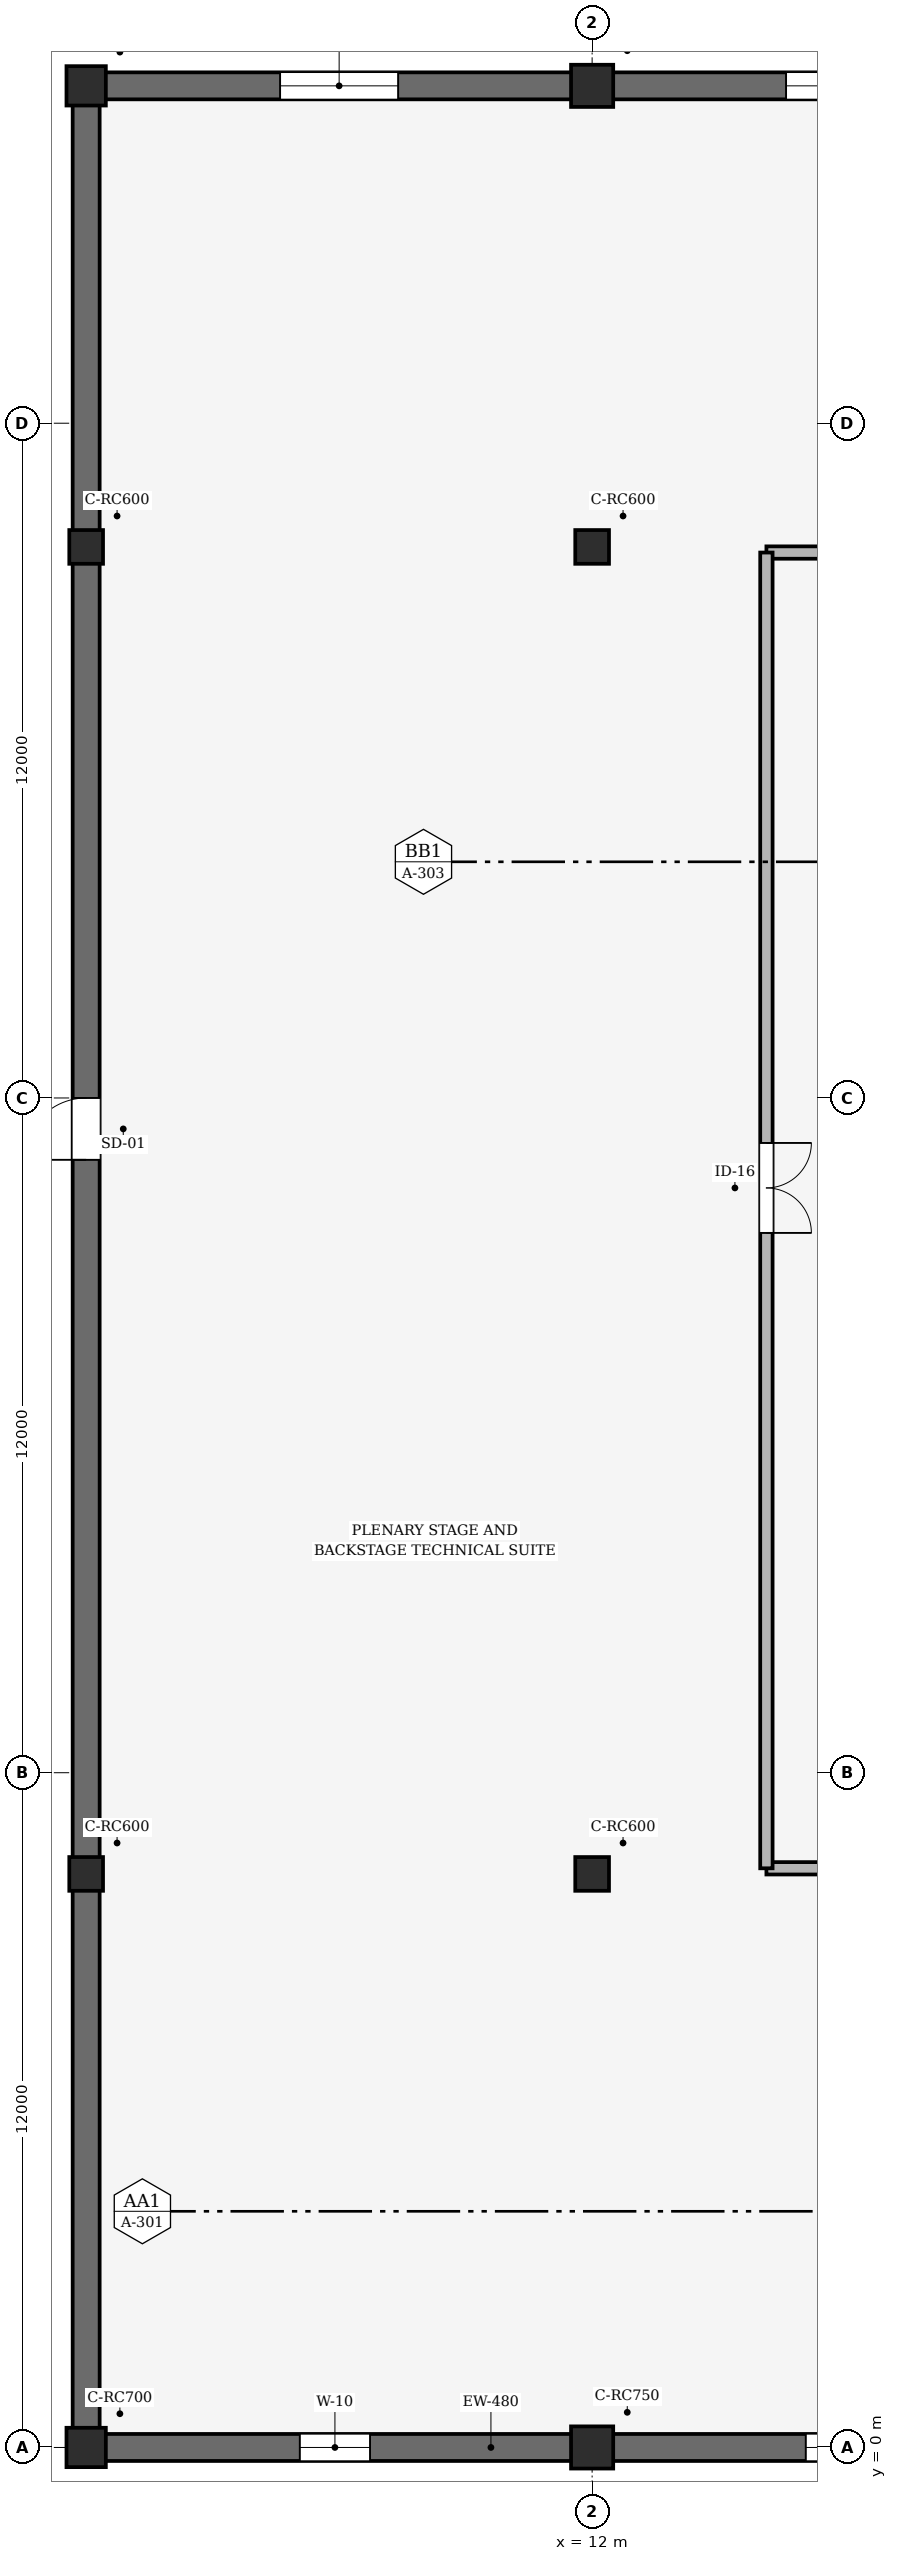
"""IFC4 building model, lengths in metres.
Left out: names, types, materials, properties, quantities, classifications, styles, units other than length and angle.
Written with IfcOpenShell. Run it as: python <this file> out.ifc"""

import sys

from ifc_helpers import new_model, si_unit, direction, frame, frame_2d, origin, origin_2d, place, context, subcontext, project, spatial, rectangle, extrude, element, fill, save


model = new_model("IFC4")
c1 = context("Model", 3, precision=1e-05, world=origin(), true_north=direction((0.0, 1.0)))
c2 = subcontext(c1, "Body", "Model", "MODEL_VIEW")
j1 = project(units=[si_unit("LENGTHUNIT", "METRE"), si_unit("PLANEANGLEUNIT", "RADIAN")], contexts=[c1])
p1 = place(None, origin())
s1 = spatial("IfcSite", under=j1, at=p1, CompositionType="ELEMENT")
p2 = place(p1, origin())
s2 = spatial("IfcBuilding", under=s1, at=p2, CompositionType="ELEMENT")
p3 = place(p2, origin())
s3 = spatial("IfcBuildingStorey", under=s2, at=p3, CompositionType="ELEMENT", Elevation=0.0)
for number, where, z_axis, x_axis in (
    (1, (3.0, 0.0, -0.44), (0.0, 0.0, 1.0), (1.0, 0.0, 0.0)),
    (2, (3.0, 42.0, -0.44), (0.0, 0.0, 1.0), (1.0, 0.0, 0.0)),
):
    element("IfcColumn", number, at=place(p3, frame(where, z_axis=z_axis, x_axis=x_axis)), inside=s3, PredefinedType="COLUMN", context=c2, shape_type="SweptSolid", body=[
        extrude(rectangle(XDim=0.7, YDim=0.7, at=origin_2d()), origin(), (0.0, 0.0, 1.0), 5.84),
    ])
for number, where, z_axis, x_axis in (
    (3, (3.0, 10.2, -0.44), (0.0, 0.0, 1.0), (1.0, 0.0, 0.0)),
    (4, (3.0, 33.8, -0.44), (0.0, 0.0, 1.0), (1.0, 0.0, 0.0)),
):
    element("IfcColumn", number, at=place(p3, frame(where, z_axis=z_axis, x_axis=x_axis)), inside=s3, PredefinedType="COLUMN", context=c2, shape_type="SweptSolid", body=[
        extrude(rectangle(XDim=0.6, YDim=0.6, at=origin_2d()), origin(), (0.0, 0.0, 1.0), 5.84),
    ])
for number, where, z_axis, x_axis in (
    (5, (12.0, 0.0, -0.44), (0.0, 0.0, 1.0), (1.0, 0.0, 0.0)),
    (6, (12.0, 42.0, -0.44), (0.0, 0.0, 1.0), (1.0, 0.0, 0.0)),
):
    element("IfcColumn", number, at=place(p3, frame(where, z_axis=z_axis, x_axis=x_axis)), inside=s3, PredefinedType="COLUMN", context=c2, shape_type="SweptSolid", body=[
        extrude(rectangle(XDim=0.75, YDim=0.75, at=origin_2d()), origin(), (0.0, 0.0, 1.0), 5.84),
    ])
for number, where, z_axis, x_axis in (
    (7, (12.0, 10.2, -0.44), (0.0, 0.0, 1.0), (1.0, 0.0, 0.0)),
    (8, (12.0, 33.8, -0.44), (0.0, 0.0, 1.0), (1.0, 0.0, 0.0)),
):
    element("IfcColumn", number, at=place(p3, frame(where, z_axis=z_axis, x_axis=x_axis)), inside=s3, PredefinedType="COLUMN", context=c2, shape_type="SweptSolid", body=[
        extrude(rectangle(XDim=0.6, YDim=0.6, at=origin_2d()), origin(), (0.0, 0.0, 1.0), 5.84),
    ])
p4 = place(p3, frame((3.0, 0.0, 0.0), z_axis=(0.0, 0.0, 1.0), x_axis=(1.0, 0.0, 0.0)))
e9 = element("IfcWall", 9, at=p4, inside=s3, PredefinedType="SOLIDWALL", context=c2, shape_type="SweptSolid", body=[
    extrude(rectangle(XDim=9.0, YDim=0.48, at=frame_2d((4.5, 0.0))), origin(), (0.0, 0.0, 1.0), 4.65),
])
p5 = place(p4, frame((3.8, 0.0, 1.3)))
e10 = element("IfcOpeningElement", 10, at=p5, cuts=e9, PredefinedType="OPENING", context=c2, shape_type="SweptSolid", body=[
    extrude(rectangle(XDim=1.25, YDim=1.85, at=frame_2d((0.625, 0.925))), frame((0.0, 0.25, 0.0), z_axis=(0.0, -1.0, 0.0), x_axis=(1.0, 0.0, 0.0)), (0.0, 0.0, 1.0), 0.5),
])
p6 = place(p3, frame((12.0, 42.0, 0.0), z_axis=(0.0, 0.0, 1.0), x_axis=(-1.0, 0.0, 0.0)))
e11 = element("IfcWall", 11, at=p6, inside=s3, PredefinedType="SOLIDWALL", context=c2, shape_type="SweptSolid", body=[
    extrude(rectangle(XDim=9.0, YDim=0.48, at=frame_2d((4.5, 0.0))), origin(), (0.0, 0.0, 1.0), 4.65),
])
p7 = place(p6, frame((3.45, 0.0, 0.9)))
e12 = element("IfcOpeningElement", 12, at=p7, cuts=e11, PredefinedType="OPENING", context=c2, shape_type="SweptSolid", body=[
    extrude(rectangle(XDim=2.1, YDim=2.95, at=frame_2d((1.05, 1.475))), frame((0.0, 0.25, 0.0), z_axis=(0.0, -1.0, 0.0), x_axis=(1.0, 0.0, 0.0)), (0.0, 0.0, 1.0), 0.5),
])
p8 = place(p3, frame((12.0, 0.0, 0.0), z_axis=(0.0, 0.0, 1.0), x_axis=(1.0, 0.0, 0.0)))
e13 = element("IfcWall", 13, at=p8, inside=s3, PredefinedType="SOLIDWALL", context=c2, shape_type="SweptSolid", body=[
    extrude(rectangle(XDim=9.0, YDim=0.48, at=frame_2d((4.5, 0.0))), origin(), (0.0, 0.0, 1.0), 4.65),
])
p9 = place(p8, frame((3.8, 0.0, 1.3)))
e14 = element("IfcOpeningElement", 14, at=p9, cuts=e13, PredefinedType="OPENING", context=c2, shape_type="SweptSolid", body=[
    extrude(rectangle(XDim=1.15, YDim=1.7, at=frame_2d((0.575, 0.85))), frame((0.0, 0.25, 0.0), z_axis=(0.0, -1.0, 0.0), x_axis=(1.0, 0.0, 0.0)), (0.0, 0.0, 1.0), 0.5),
])
p10 = place(p3, frame((21.0, 42.0, 0.0), z_axis=(0.0, 0.0, 1.0), x_axis=(-1.0, 0.0, 0.0)))
e15 = element("IfcWall", 15, at=p10, inside=s3, PredefinedType="SOLIDWALL", context=c2, shape_type="SweptSolid", body=[
    extrude(rectangle(XDim=9.0, YDim=0.48, at=frame_2d((4.5, 0.0))), origin(), (0.0, 0.0, 1.0), 4.65),
])
p11 = place(p10, frame((3.45, 0.0, 0.9)))
e16 = element("IfcOpeningElement", 16, at=p11, cuts=e15, PredefinedType="OPENING", context=c2, shape_type="SweptSolid", body=[
    extrude(rectangle(XDim=2.1, YDim=2.95, at=frame_2d((1.05, 1.475))), frame((0.0, 0.25, 0.0), z_axis=(0.0, -1.0, 0.0), x_axis=(1.0, 0.0, 0.0)), (0.0, 0.0, 1.0), 0.5),
])
p12 = place(p3, frame((3.0, 42.0, 0.0), z_axis=(0.0, 0.0, 1.0), x_axis=(0.0, -1.0, 0.0)))
e17 = element("IfcWall", 17, at=p12, inside=s3, PredefinedType="SOLIDWALL", context=c2, shape_type="SweptSolid", body=[
    extrude(rectangle(XDim=42.0, YDim=0.48, at=frame_2d((21.0, 0.0))), origin(), (0.0, 0.0, 1.0), 4.65),
])
p13 = place(p12, frame((18.0, 0.0, 0.0)))
e18 = element("IfcOpeningElement", 18, at=p13, cuts=e17, PredefinedType="OPENING", context=c2, shape_type="SweptSolid", body=[
    extrude(rectangle(XDim=1.1, YDim=2.2, at=frame_2d((0.55, 1.1))), frame((0.0, 0.25, 0.0), z_axis=(0.0, -1.0, 0.0), x_axis=(1.0, 0.0, 0.0)), (0.0, 0.0, 1.0), 0.5),
])
p14 = place(p3, frame((15.1, 10.3, 0.0), z_axis=(0.0, 0.0, 1.0), x_axis=(1.0, 0.0, 0.0)))
e19 = element("IfcWall", 19, at=p14, inside=s3, PredefinedType="SOLIDWALL", context=c2, shape_type="SweptSolid", body=[
    extrude(rectangle(XDim=35.8, YDim=0.22, at=frame_2d((17.9, 0.0))), origin(), (0.0, 0.0, 1.0), 4.1),
])
p15 = place(p14, frame((9.4, 0.0, 0.0)))
e20 = element("IfcOpeningElement", 20, at=p15, cuts=e19, PredefinedType="OPENING", context=c2, shape_type="SweptSolid", body=[
    extrude(rectangle(XDim=2.05, YDim=2.3, at=frame_2d((1.025, 1.15))), frame((0.0, 0.12, 0.0), z_axis=(0.0, -1.0, 0.0), x_axis=(1.0, 0.0, 0.0)), (0.0, 0.0, 1.0), 0.24),
])
p16 = place(p14, frame((27.4, 0.0, 0.0)))
e21 = element("IfcOpeningElement", 21, at=p16, cuts=e19, PredefinedType="OPENING", context=c2, shape_type="SweptSolid", body=[
    extrude(rectangle(XDim=2.05, YDim=2.3, at=frame_2d((1.025, 1.15))), frame((0.0, 0.12, 0.0), z_axis=(0.0, -1.0, 0.0), x_axis=(1.0, 0.0, 0.0)), (0.0, 0.0, 1.0), 0.24),
])
p17 = place(p3, frame((50.9, 33.7, 0.0), z_axis=(0.0, 0.0, 1.0), x_axis=(-1.0, 0.0, 0.0)))
e22 = element("IfcWall", 22, at=p17, inside=s3, PredefinedType="SOLIDWALL", context=c2, shape_type="SweptSolid", body=[
    extrude(rectangle(XDim=35.8, YDim=0.22, at=frame_2d((17.9, 0.0))), origin(), (0.0, 0.0, 1.0), 4.1),
])
p18 = place(p17, frame((15.35, 0.0, 0.0)))
e23 = element("IfcOpeningElement", 23, at=p18, cuts=e22, PredefinedType="OPENING", context=c2, shape_type="SweptSolid", body=[
    extrude(rectangle(XDim=2.05, YDim=2.3, at=frame_2d((1.025, 1.15))), frame((0.0, 0.12, 0.0), z_axis=(0.0, -1.0, 0.0), x_axis=(1.0, 0.0, 0.0)), (0.0, 0.0, 1.0), 0.24),
])
p19 = place(p17, frame((24.35, 0.0, 0.0)))
e24 = element("IfcOpeningElement", 24, at=p19, cuts=e22, PredefinedType="OPENING", context=c2, shape_type="SweptSolid", body=[
    extrude(rectangle(XDim=2.05, YDim=2.3, at=frame_2d((1.025, 1.15))), frame((0.0, 0.12, 0.0), z_axis=(0.0, -1.0, 0.0), x_axis=(1.0, 0.0, 0.0)), (0.0, 0.0, 1.0), 0.24),
])
p20 = place(p3, frame((15.1, 33.7, 0.0), z_axis=(0.0, 0.0, 1.0), x_axis=(0.0, -1.0, 0.0)))
e25 = element("IfcWall", 25, at=p20, inside=s3, PredefinedType="SOLIDWALL", context=c2, shape_type="SweptSolid", body=[
    extrude(rectangle(XDim=23.4, YDim=0.22, at=frame_2d((11.7, 0.0))), origin(), (0.0, 0.0, 1.0), 4.1),
])
p21 = place(p20, frame((10.5, 0.0, 0.0)))
e26 = element("IfcOpeningElement", 26, at=p21, cuts=e25, PredefinedType="OPENING", context=c2, shape_type="SweptSolid", body=[
    extrude(rectangle(XDim=1.6, YDim=2.2, at=frame_2d((0.8, 1.1))), frame((0.0, 0.12, 0.0), z_axis=(0.0, -1.0, 0.0), x_axis=(1.0, 0.0, 0.0)), (0.0, 0.0, 1.0), 0.24),
])
p22 = place(p5, origin())
e27 = element("IfcWindow", 27, at=p22, inside=s3, PartitioningType="SINGLE_PANEL", PredefinedType="WINDOW", context=c2, shape_type="SweptSolid", body=[
    extrude(rectangle(XDim=1.25, YDim=1.85, at=frame_2d((0.625, 0.925))), frame((0.0, 0.03, 0.0), z_axis=(0.0, -1.0, 0.0), x_axis=(1.0, 0.0, 0.0)), (0.0, 0.0, 1.0), 0.06),
])
fill(e10, e27)
p23 = place(p7, origin())
e28 = element("IfcWindow", 28, at=p23, inside=s3, PartitioningType="DOUBLE_PANEL_VERTICAL", PredefinedType="WINDOW", context=c2, shape_type="SweptSolid", body=[
    extrude(rectangle(XDim=2.1, YDim=2.95, at=frame_2d((1.05, 1.475))), frame((0.0, 0.03, 0.0), z_axis=(0.0, -1.0, 0.0), x_axis=(1.0, 0.0, 0.0)), (0.0, 0.0, 1.0), 0.06),
])
fill(e12, e28)
p24 = place(p9, origin())
e29 = element("IfcWindow", 29, at=p24, inside=s3, PartitioningType="SINGLE_PANEL", PredefinedType="WINDOW", context=c2, shape_type="SweptSolid", body=[
    extrude(rectangle(XDim=1.15, YDim=1.7, at=frame_2d((0.575, 0.85))), frame((0.0, 0.03, 0.0), z_axis=(0.0, -1.0, 0.0), x_axis=(1.0, 0.0, 0.0)), (0.0, 0.0, 1.0), 0.06),
])
fill(e14, e29)
p25 = place(p11, origin())
e30 = element("IfcWindow", 30, at=p25, inside=s3, PartitioningType="DOUBLE_PANEL_VERTICAL", PredefinedType="WINDOW", context=c2, shape_type="SweptSolid", body=[
    extrude(rectangle(XDim=2.1, YDim=2.95, at=frame_2d((1.05, 1.475))), frame((0.0, 0.03, 0.0), z_axis=(0.0, -1.0, 0.0), x_axis=(1.0, 0.0, 0.0)), (0.0, 0.0, 1.0), 0.06),
])
fill(e16, e30)
p26 = place(p13, frame((1.1, 0.0, 0.0), z_axis=(0.0, 0.0, 1.0), x_axis=(-1.0, 0.0, 0.0)))
e31 = element("IfcDoor", 31, at=p26, inside=s3, OperationType="SINGLE_SWING_LEFT", PredefinedType="DOOR", context=c2, shape_type="SweptSolid", body=[
    extrude(rectangle(XDim=1.1, YDim=2.2, at=frame_2d((0.55, 1.1))), frame((0.0, 0.025, 0.0), z_axis=(0.0, -1.0, 0.0), x_axis=(1.0, 0.0, 0.0)), (0.0, 0.0, 1.0), 0.05),
])
fill(e18, e31)
p27 = place(p21, origin())
e32 = element("IfcDoor", 32, at=p27, inside=s3, OperationType="DOUBLE_DOOR_SINGLE_SWING", PredefinedType="DOOR", context=c2, shape_type="SweptSolid", body=[
    extrude(rectangle(XDim=1.6, YDim=2.2, at=frame_2d((0.8, 1.1))), frame((0.0, 0.025, 0.0), z_axis=(0.0, -1.0, 0.0), x_axis=(1.0, 0.0, 0.0)), (0.0, 0.0, 1.0), 0.05),
])
fill(e26, e32)
save(model, sys.argv[1])
